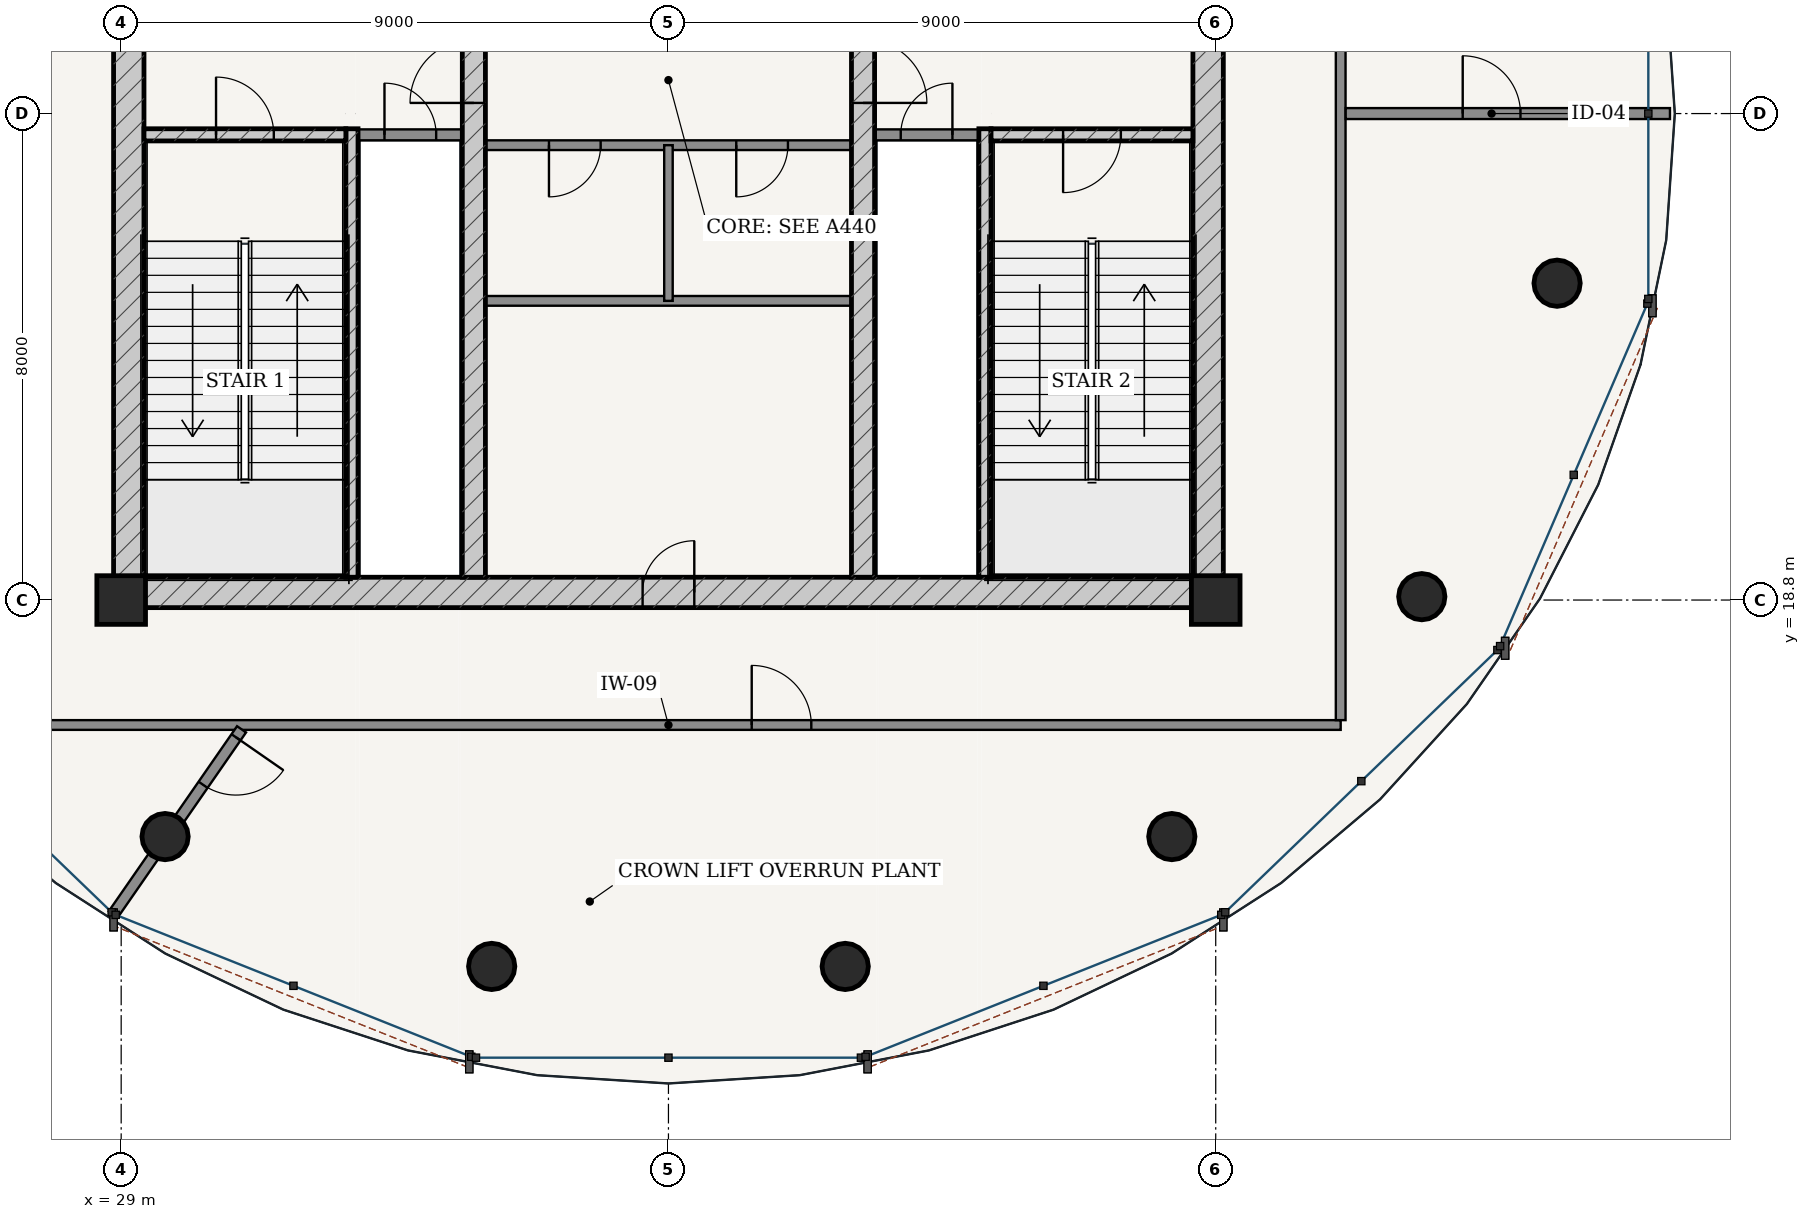
"""IFC4 building model, lengths in metres.
Left out: names, types, materials, properties, quantities, classifications, styles, units other than length and angle.
Written with IfcOpenShell. Run it as: python <this file> out.ifc"""

import sys

from ifc_helpers import new_model, si_unit, direction, frame, frame_2d, origin, origin_2d, place, context, subcontext, project, spatial, rectangle, hollow_circle, extrude, source, transform, mapped, element, fill, save


model = new_model("IFC4")
c1 = context("Model", 3, precision=1e-05, world=origin(), true_north=direction((-0.2419218956, 0.970295726276)))
c2 = subcontext(c1, "Body", "Model", "MODEL_VIEW")
j1 = project(units=[si_unit("LENGTHUNIT", "METRE"), si_unit("PLANEANGLEUNIT", "RADIAN")], contexts=[c1])
p1 = place(None, origin())
s1 = spatial("IfcSite", under=j1, at=p1, CompositionType="ELEMENT")
p2 = place(p1, origin())
s2 = spatial("IfcBuilding", under=s1, at=p2, CompositionType="ELEMENT")
p3 = place(p2, frame((0.0, 0.0, 326.9)))
s3 = spatial("IfcBuildingStorey", under=s2, at=p3, CompositionType="ELEMENT", Elevation=326.9)
for number, where, z_axis, x_axis in (
    (1, (29.0, 18.8, 0.0), (0.0, 0.0, 1.0), (1.0, 0.0, 0.0)),
    (2, (47.0, 18.8, 0.0), (0.0, 0.0, 1.0), (1.0, 0.0, 0.0)),
):
    element("IfcColumn", number, at=place(p3, frame(where, z_axis=z_axis, x_axis=x_axis)), inside=s3, PredefinedType="COLUMN", context=c2, shape_type="SweptSolid", body=[
        extrude(rectangle(XDim=0.8, YDim=0.8, at=origin_2d()), origin(), (0.0, 0.0, 1.0), 5.2),
    ])
p4 = place(p3, frame((28.875, 18.925, 0.0), z_axis=(0.0, 0.0, 1.0), x_axis=(1.0, 0.0, 0.0)))
e3 = element("IfcWall", 3, at=p4, inside=s3, PredefinedType="SHEAR", context=c2, shape_type="SweptSolid", body=[
    extrude(rectangle(XDim=18.25, YDim=0.5, at=frame_2d((9.125, 0.0))), origin(), (0.0, 0.0, 1.0), 4.78),
])
p5 = place(p4, frame((8.7, 0.0, 0.0)))
e4 = element("IfcOpeningElement", 4, at=p5, cuts=e3, PredefinedType="OPENING", context=c2, shape_type="SweptSolid", body=[
    extrude(rectangle(XDim=0.85, YDim=2.1, at=frame_2d((0.425, 1.05))), frame((0.0, 0.26, 0.0), z_axis=(0.0, -1.0, 0.0), x_axis=(1.0, 0.0, 0.0)), (0.0, 0.0, 1.0), 0.52),
])
p6 = place(p3, frame((29.125, 19.175, 0.0), z_axis=(0.0, 0.0, 1.0), x_axis=(0.0, 1.0, 0.0)))
e5 = element("IfcWall", 5, at=p6, inside=s3, PredefinedType="SHEAR", context=c2, shape_type="SweptSolid", body=[
    extrude(rectangle(XDim=15.25, YDim=0.5, at=frame_2d((7.625, 0.0))), origin(), (0.0, 0.0, 1.0), 4.78),
])
p7 = place(p6, frame((9.875, 0.0, 0.0)))
e6 = element("IfcOpeningElement", 6, at=p7, cuts=e5, PredefinedType="OPENING", context=c2, shape_type="SweptSolid", body=[
    extrude(rectangle(XDim=1.5, YDim=2.2, at=frame_2d((0.75, 1.1))), frame((0.0, 0.26, 0.0), z_axis=(0.0, -1.0, 0.0), x_axis=(1.0, 0.0, 0.0)), (0.0, 0.0, 1.0), 0.52),
])
p8 = place(p3, frame((46.875, 19.175, 0.0), z_axis=(0.0, 0.0, 1.0), x_axis=(0.0, 1.0, 0.0)))
e7 = element("IfcWall", 7, at=p8, inside=s3, PredefinedType="SHEAR", context=c2, shape_type="SweptSolid", body=[
    extrude(rectangle(XDim=15.25, YDim=0.5, at=frame_2d((7.625, 0.0))), origin(), (0.0, 0.0, 1.0), 4.78),
])
p9 = place(p8, frame((9.875, 0.0, 0.0)))
e8 = element("IfcOpeningElement", 8, at=p9, cuts=e7, PredefinedType="OPENING", context=c2, shape_type="SweptSolid", body=[
    extrude(rectangle(XDim=1.5, YDim=2.2, at=frame_2d((0.75, 1.1))), frame((0.0, 0.26, 0.0), z_axis=(0.0, -1.0, 0.0), x_axis=(1.0, 0.0, 0.0)), (0.0, 0.0, 1.0), 0.52),
])
p10 = place(p3, frame((32.795, 19.175, 0.0), z_axis=(0.0, 0.0, 1.0), x_axis=(0.0, 1.0, 0.0)))
e9 = element("IfcWall", 9, at=p10, inside=s3, PredefinedType="SOLIDWALL", context=c2, shape_type="SweptSolid", body=[
    extrude(rectangle(XDim=7.375, YDim=0.2, at=frame_2d((3.688, 0.0))), origin(), (0.0, 0.0, 1.0), 4.78),
])
p11 = place(p3, frame((29.375, 26.45, 0.0), z_axis=(0.0, 0.0, 1.0), x_axis=(1.0, 0.0, 0.0)))
e10 = element("IfcWall", 10, at=p11, inside=s3, PredefinedType="SOLIDWALL", context=c2, shape_type="SweptSolid", body=[
    extrude(rectangle(XDim=3.32, YDim=0.2, at=frame_2d((1.66, 0.0))), origin(), (0.0, 0.0, 1.0), 4.78),
])
p12 = place(p11, frame((1.185, 0.0, 0.0)))
e11 = element("IfcOpeningElement", 11, at=p12, cuts=e10, PredefinedType="OPENING", context=c2, shape_type="SweptSolid", body=[
    extrude(rectangle(XDim=0.95, YDim=2.15, at=frame_2d((0.475, 1.075))), frame((0.0, 0.11, 0.0), z_axis=(0.0, -1.0, 0.0), x_axis=(1.0, 0.0, 0.0)), (0.0, 0.0, 1.0), 0.22),
])
p13 = place(p3, frame((43.205, 19.175, 0.0), z_axis=(0.0, 0.0, 1.0), x_axis=(0.0, 1.0, 0.0)))
e12 = element("IfcWall", 12, at=p13, inside=s3, PredefinedType="SOLIDWALL", context=c2, shape_type="SweptSolid", body=[
    extrude(rectangle(XDim=7.375, YDim=0.2, at=frame_2d((3.688, 0.0))), origin(), (0.0, 0.0, 1.0), 4.78),
])
p14 = place(p3, frame((43.305, 26.45, 0.0), z_axis=(0.0, 0.0, 1.0), x_axis=(1.0, 0.0, 0.0)))
e13 = element("IfcWall", 13, at=p14, inside=s3, PredefinedType="SOLIDWALL", context=c2, shape_type="SweptSolid", body=[
    extrude(rectangle(XDim=3.32, YDim=0.2, at=frame_2d((1.66, 0.0))), origin(), (0.0, 0.0, 1.0), 4.78),
])
p15 = place(p14, frame((1.185, 0.0, 0.0)))
e14 = element("IfcOpeningElement", 14, at=p15, cuts=e13, PredefinedType="OPENING", context=c2, shape_type="SweptSolid", body=[
    extrude(rectangle(XDim=0.95, YDim=2.15, at=frame_2d((0.475, 1.075))), frame((0.0, 0.11, 0.0), z_axis=(0.0, -1.0, 0.0), x_axis=(1.0, 0.0, 0.0)), (0.0, 0.0, 1.0), 0.22),
])
p16 = place(p3, frame((34.8, 19.175, 0.0), z_axis=(0.0, 0.0, 1.0), x_axis=(0.0, 1.0, 0.0)))
e15 = element("IfcWall", 15, at=p16, inside=s3, PredefinedType="SHEAR", context=c2, shape_type="SweptSolid", body=[
    extrude(rectangle(XDim=15.25, YDim=0.38, at=frame_2d((7.625, 0.0))), origin(), (0.0, 0.0, 1.0), 4.78),
])
p17 = place(p16, frame((7.8, 0.0, 0.0)))
e16 = element("IfcOpeningElement", 16, at=p17, cuts=e15, PredefinedType="OPENING", context=c2, shape_type="SweptSolid", body=[
    extrude(rectangle(XDim=1.05, YDim=2.15, at=frame_2d((0.525, 1.075))), frame((0.0, 0.2, 0.0), z_axis=(0.0, -1.0, 0.0), x_axis=(1.0, 0.0, 0.0)), (0.0, 0.0, 1.0), 0.4),
])
p18 = place(p3, frame((41.2, 19.175, 0.0), z_axis=(0.0, 0.0, 1.0), x_axis=(0.0, 1.0, 0.0)))
e17 = element("IfcWall", 17, at=p18, inside=s3, PredefinedType="SHEAR", context=c2, shape_type="SweptSolid", body=[
    extrude(rectangle(XDim=15.25, YDim=0.38, at=frame_2d((7.625, 0.0))), origin(), (0.0, 0.0, 1.0), 4.78),
])
p19 = place(p18, frame((7.8, 0.0, 0.0)))
e18 = element("IfcOpeningElement", 18, at=p19, cuts=e17, PredefinedType="OPENING", context=c2, shape_type="SweptSolid", body=[
    extrude(rectangle(XDim=1.05, YDim=2.15, at=frame_2d((0.525, 1.075))), frame((0.0, 0.2, 0.0), z_axis=(0.0, -1.0, 0.0), x_axis=(1.0, 0.0, 0.0)), (0.0, 0.0, 1.0), 0.4),
])
for number, where, z_axis, x_axis in (
    (19, (29.722, 14.91, 0.0), (0.0, 0.0, 1.0), (1.0, 0.0, 0.0)),
    (20, (35.093, 12.775, 0.0), (0.0, 0.0, 1.0), (1.0, 0.0, 0.0)),
    (21, (40.907, 12.775, 0.0), (0.0, 0.0, 1.0), (1.0, 0.0, 0.0)),
    (22, (46.278, 14.91, 0.0), (0.0, 0.0, 1.0), (1.0, 0.0, 0.0)),
    (23, (50.389, 18.855, 0.0), (0.0, 0.0, 1.0), (1.0, 0.0, 0.0)),
    (24, (52.614, 24.01, 0.0), (0.0, 0.0, 1.0), (1.0, 0.0, 0.0)),
):
    element("IfcColumn", number, at=place(p3, frame(where, z_axis=z_axis, x_axis=x_axis)), inside=s3, PredefinedType="COLUMN", context=c2, shape_type="SweptSolid", body=[
        extrude(hollow_circle(Radius=0.381, WallThickness=0.028, at=origin_2d()), origin(), (0.0, 0.0, 1.0), 5.2),
    ])
p20 = place(p3, frame((32.9, 26.45, 0.0), z_axis=(0.0, 0.0, 1.0), x_axis=(1.0, 0.0, 0.0)))
e25 = element("IfcWall", 25, at=p20, inside=s3, PredefinedType="PARTITIONING", context=c2, shape_type="SweptSolid", body=[
    extrude(rectangle(XDim=1.71, YDim=0.18, at=frame_2d((0.855, 0.0))), origin(), (0.0, 0.0, 1.0), 4.78),
])
p21 = place(p20, frame((0.43, 0.0, 0.0)))
e26 = element("IfcOpeningElement", 26, at=p21, cuts=e25, PredefinedType="OPENING", context=c2, shape_type="SweptSolid", body=[
    extrude(rectangle(XDim=0.85, YDim=2.1, at=frame_2d((0.425, 1.05))), frame((0.0, 0.1, 0.0), z_axis=(0.0, -1.0, 0.0), x_axis=(1.0, 0.0, 0.0)), (0.0, 0.0, 1.0), 0.2),
])
p22 = place(p3, frame((41.39, 26.45, 0.0), z_axis=(0.0, 0.0, 1.0), x_axis=(1.0, 0.0, 0.0)))
e27 = element("IfcWall", 27, at=p22, inside=s3, PredefinedType="PARTITIONING", context=c2, shape_type="SweptSolid", body=[
    extrude(rectangle(XDim=1.71, YDim=0.18, at=frame_2d((0.855, 0.0))), origin(), (0.0, 0.0, 1.0), 4.78),
])
p23 = place(p22, frame((0.43, 0.0, 0.0)))
e28 = element("IfcOpeningElement", 28, at=p23, cuts=e27, PredefinedType="OPENING", context=c2, shape_type="SweptSolid", body=[
    extrude(rectangle(XDim=0.85, YDim=2.1, at=frame_2d((0.425, 1.05))), frame((0.0, 0.1, 0.0), z_axis=(0.0, -1.0, 0.0), x_axis=(1.0, 0.0, 0.0)), (0.0, 0.0, 1.0), 0.2),
])
p24 = place(p3, frame((34.99, 26.28, 0.0), z_axis=(0.0, 0.0, 1.0), x_axis=(1.0, 0.0, 0.0)))
e29 = element("IfcWall", 29, at=p24, inside=s3, PredefinedType="PARTITIONING", context=c2, shape_type="SweptSolid", body=[
    extrude(rectangle(XDim=6.02, YDim=0.16, at=frame_2d((3.01, 0.0))), origin(), (0.0, 0.0, 1.0), 4.78),
])
p25 = place(p24, frame((1.045, 0.0, 0.0)))
e30 = element("IfcOpeningElement", 30, at=p25, cuts=e29, PredefinedType="OPENING", context=c2, shape_type="SweptSolid", body=[
    extrude(rectangle(XDim=0.85, YDim=2.1, at=frame_2d((0.425, 1.05))), frame((0.0, 0.09, 0.0), z_axis=(0.0, -1.0, 0.0), x_axis=(1.0, 0.0, 0.0)), (0.0, 0.0, 1.0), 0.18),
])
p26 = place(p24, frame((4.125, 0.0, 0.0)))
e31 = element("IfcOpeningElement", 31, at=p26, cuts=e29, PredefinedType="OPENING", context=c2, shape_type="SweptSolid", body=[
    extrude(rectangle(XDim=0.85, YDim=2.1, at=frame_2d((0.425, 1.05))), frame((0.0, 0.09, 0.0), z_axis=(0.0, -1.0, 0.0), x_axis=(1.0, 0.0, 0.0)), (0.0, 0.0, 1.0), 0.18),
])
p27 = place(p3, frame((34.99, 23.72, 0.0), z_axis=(0.0, 0.0, 1.0), x_axis=(1.0, 0.0, 0.0)))
e32 = element("IfcWall", 32, at=p27, inside=s3, PredefinedType="PARTITIONING", context=c2, shape_type="SweptSolid", body=[
    extrude(rectangle(XDim=6.02, YDim=0.16, at=frame_2d((3.01, 0.0))), origin(), (0.0, 0.0, 1.0), 4.78),
])
p28 = place(p3, frame((38.0, 23.72, 0.0), z_axis=(0.0, 0.0, 1.0), x_axis=(0.0, 1.0, 0.0)))
e33 = element("IfcWall", 33, at=p28, inside=s3, PredefinedType="PARTITIONING", context=c2, shape_type="SweptSolid", body=[
    extrude(rectangle(XDim=2.56, YDim=0.14, at=frame_2d((1.28, 0.0))), origin(), (0.0, 0.0, 1.0), 4.78),
])
p29 = place(p3, frame((26.945, 16.745, 0.0), z_axis=(0.0, 0.0, 1.0), x_axis=(1.0, 0.0, 0.0)))
e34 = element("IfcWall", 34, at=p29, inside=s3, PredefinedType="PARTITIONING", context=c2, shape_type="SweptSolid", body=[
    extrude(rectangle(XDim=22.11, YDim=0.16, at=frame_2d((11.055, 0.0))), origin(), (0.0, 0.0, 1.0), 4.352),
])
p30 = place(p29, frame((12.424, 0.0, 0.0)))
e35 = element("IfcOpeningElement", 35, at=p30, cuts=e34, PredefinedType="OPENING", context=c2, shape_type="SweptSolid", body=[
    extrude(rectangle(XDim=0.98, YDim=2.2, at=frame_2d((0.49, 1.1))), frame((0.0, 0.09, 0.0), z_axis=(0.0, -1.0, 0.0), x_axis=(1.0, 0.0, 0.0)), (0.0, 0.0, 1.0), 0.18),
])
p31 = place(p3, frame((49.055, 16.825, 0.0), z_axis=(0.0, 0.0, 1.0), x_axis=(0.0, 1.0, 0.0)))
e36 = element("IfcWall", 36, at=p31, inside=s3, PredefinedType="PARTITIONING", context=c2, shape_type="SweptSolid", body=[
    extrude(rectangle(XDim=19.95, YDim=0.16, at=frame_2d((9.975, 0.0))), origin(), (0.0, 0.0, 1.0), 4.352),
])
p32 = place(p3, frame((49.137, 26.8, 0.0), z_axis=(0.0, 0.0, 1.0), x_axis=(1.0, 0.0, 0.0)))
e37 = element("IfcWall", 37, at=p32, inside=s3, PredefinedType="PARTITIONING", context=c2, shape_type="SweptSolid", body=[
    extrude(rectangle(XDim=5.333, YDim=0.18, at=frame_2d((2.667, 0.0))), origin(), (0.0, 0.0, 1.0), 4.411),
])
p33 = place(p32, frame((1.925, 0.0, 0.0)))
e38 = element("IfcOpeningElement", 38, at=p33, cuts=e37, PredefinedType="OPENING", context=c2, shape_type="SweptSolid", body=[
    extrude(rectangle(XDim=0.95, YDim=2.15, at=frame_2d((0.475, 1.075))), frame((0.0, 0.1, 0.0), z_axis=(0.0, -1.0, 0.0), x_axis=(1.0, 0.0, 0.0)), (0.0, 0.0, 1.0), 0.2),
])
p34 = place(p3, frame((30.979, 16.674, 0.0), z_axis=(0.0, 0.0, 1.0), x_axis=(-0.569738046405, -0.82182635543, 0.0)))
e39 = element("IfcWall", 39, at=p34, inside=s3, PredefinedType="PARTITIONING", context=c2, shape_type="SweptSolid", body=[
    extrude(rectangle(XDim=3.701, YDim=0.18, at=frame_2d((1.851, 0.0))), origin(), (0.0, 0.0, 1.0), 4.352),
])
p35 = place(p34, frame((0.16, 0.0, 0.0)))
e40 = element("IfcOpeningElement", 40, at=p35, cuts=e39, PredefinedType="OPENING", context=c2, shape_type="SweptSolid", body=[
    extrude(rectangle(XDim=0.95, YDim=2.15, at=frame_2d((0.475, 1.075))), frame((0.0, 0.1, 0.0), z_axis=(0.0, -1.0, 0.0), x_axis=(1.0, 0.0, 0.0)), (0.0, 0.0, 1.0), 0.2),
])
m1 = source(origin(), c2, "Body", "SweptSolid", [
    extrude(rectangle(XDim=1.05, YDim=2.15, at=frame_2d((0.525, 1.075))), frame((0.0, 0.025, 0.0), z_axis=(0.0, -1.0, 0.0), x_axis=(1.0, 0.0, 0.0)), (0.0, 0.0, 1.0), 0.05),
])
p36 = place(p17, origin())
e41 = element("IfcDoor", 41, at=p36, inside=s3, OperationType="SINGLE_SWING_LEFT", PredefinedType="DOOR", context=c2, shape_type="MappedRepresentation", body=[
    mapped(m1, transform((0.0, 0.0, 0.0), scale=1.0)),
])
fill(e16, e41)
p37 = place(p19, frame((1.05, 0.0, 0.0), z_axis=(0.0, 0.0, 1.0), x_axis=(-1.0, 0.0, 0.0)))
e42 = element("IfcDoor", 42, at=p37, inside=s3, OperationType="SINGLE_SWING_RIGHT", PredefinedType="DOOR", context=c2, shape_type="MappedRepresentation", body=[
    mapped(m1, transform((0.0, 0.0, 0.0), scale=1.0)),
])
fill(e18, e42)
m2 = source(origin(), c2, "Body", "SweptSolid", [
    extrude(rectangle(XDim=0.95, YDim=2.15, at=frame_2d((0.475, 1.075))), frame((0.0, 0.025, 0.0), z_axis=(0.0, -1.0, 0.0), x_axis=(1.0, 0.0, 0.0)), (0.0, 0.0, 1.0), 0.05),
])
p38 = place(p12, origin())
e43 = element("IfcDoor", 43, at=p38, inside=s3, OperationType="SINGLE_SWING_LEFT", PredefinedType="DOOR", context=c2, shape_type="MappedRepresentation", body=[
    mapped(m2, transform((0.0, 0.0, 0.0), scale=1.0)),
])
fill(e11, e43)
p39 = place(p15, frame((0.95, 0.0, 0.0), z_axis=(0.0, 0.0, 1.0), x_axis=(-1.0, 0.0, 0.0)))
e44 = element("IfcDoor", 44, at=p39, inside=s3, OperationType="SINGLE_SWING_RIGHT", PredefinedType="DOOR", context=c2, shape_type="MappedRepresentation", body=[
    mapped(m2, transform((0.0, 0.0, 0.0), scale=1.0)),
])
fill(e14, e44)
m3 = source(origin(), c2, "Body", "SweptSolid", [
    extrude(rectangle(XDim=0.85, YDim=2.1, at=frame_2d((0.425, 1.05))), frame((0.0, 0.025, 0.0), z_axis=(0.0, -1.0, 0.0), x_axis=(1.0, 0.0, 0.0)), (0.0, 0.0, 1.0), 0.05),
])
p40 = place(p21, origin())
e45 = element("IfcDoor", 45, at=p40, inside=s3, OperationType="SINGLE_SWING_LEFT", PredefinedType="DOOR", context=c2, shape_type="MappedRepresentation", body=[
    mapped(m3, transform((0.0, 0.0, 0.0), scale=1.0)),
])
fill(e26, e45)
p41 = place(p23, origin())
e46 = element("IfcDoor", 46, at=p41, inside=s3, OperationType="SINGLE_SWING_RIGHT", PredefinedType="DOOR", context=c2, shape_type="MappedRepresentation", body=[
    mapped(m3, transform((0.0, 0.0, 0.0), scale=1.0)),
])
fill(e28, e46)
p42 = place(p25, frame((0.85, 0.0, 0.0), z_axis=(0.0, 0.0, 1.0), x_axis=(-1.0, 0.0, 0.0)))
e47 = element("IfcDoor", 47, at=p42, inside=s3, OperationType="SINGLE_SWING_RIGHT", PredefinedType="DOOR", context=c2, shape_type="MappedRepresentation", body=[
    mapped(m3, transform((0.0, 0.0, 0.0), scale=1.0)),
])
fill(e30, e47)
p43 = place(p26, frame((0.85, 0.0, 0.0), z_axis=(0.0, 0.0, 1.0), x_axis=(-1.0, 0.0, 0.0)))
e48 = element("IfcDoor", 48, at=p43, inside=s3, OperationType="SINGLE_SWING_RIGHT", PredefinedType="DOOR", context=c2, shape_type="MappedRepresentation", body=[
    mapped(m3, transform((0.0, 0.0, 0.0), scale=1.0)),
])
fill(e31, e48)
p44 = place(p5, origin())
e49 = element("IfcDoor", 49, at=p44, inside=s3, OperationType="SINGLE_SWING_RIGHT", PredefinedType="DOOR", context=c2, shape_type="MappedRepresentation", body=[
    mapped(m3, transform((0.0, 0.0, 0.0), scale=1.0)),
])
fill(e4, e49)
m4 = source(origin(), c2, "Body", "SweptSolid", [
    extrude(rectangle(XDim=0.98, YDim=2.2, at=frame_2d((0.49, 1.1))), frame((0.0, 0.025, 0.0), z_axis=(0.0, -1.0, 0.0), x_axis=(1.0, 0.0, 0.0)), (0.0, 0.0, 1.0), 0.05),
])
p45 = place(p30, origin())
e50 = element("IfcDoor", 50, at=p45, inside=s3, OperationType="SINGLE_SWING_LEFT", PredefinedType="DOOR", context=c2, shape_type="MappedRepresentation", body=[
    mapped(m4, transform((0.0, 0.0, 0.0), scale=1.0)),
])
fill(e35, e50)
p46 = place(p33, origin())
e51 = element("IfcDoor", 51, at=p46, inside=s3, OperationType="SINGLE_SWING_LEFT", PredefinedType="DOOR", context=c2, shape_type="MappedRepresentation", body=[
    mapped(m2, transform((0.0, 0.0, 0.0), scale=1.0)),
])
fill(e38, e51)
p47 = place(p35, origin())
e52 = element("IfcDoor", 52, at=p47, inside=s3, OperationType="SINGLE_SWING_LEFT", PredefinedType="DOOR", context=c2, shape_type="MappedRepresentation", body=[
    mapped(m2, transform((0.0, 0.0, 0.0), scale=1.0)),
])
fill(e40, e52)
save(model, sys.argv[1])
